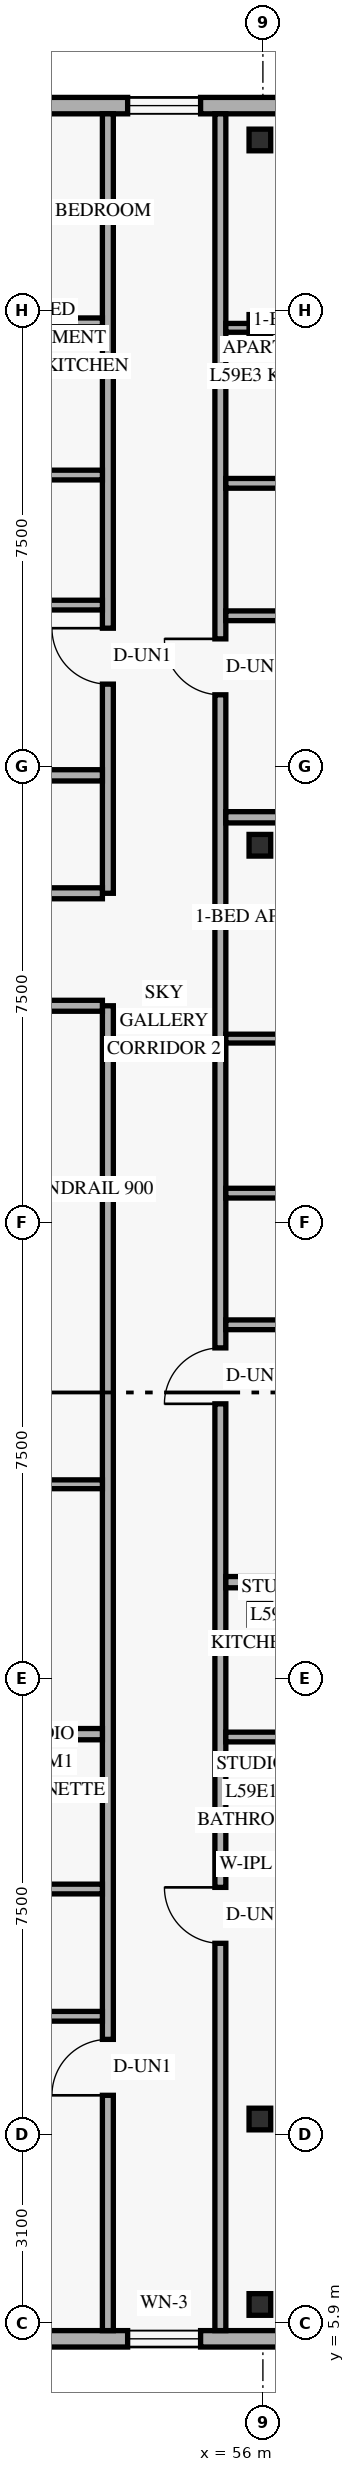
"""IFC4 building model, lengths in metres.
Left out: names, types, materials, properties, quantities, classifications, styles, units other than length and angle.
Written with IfcOpenShell. Run it as: python <this file> out.ifc"""

import sys

from ifc_helpers import new_model, si_unit, direction, frame, frame_2d, origin, origin_2d, place, context, subcontext, project, spatial, rectangle, hollow_rectangle, extrude, element, fill, save


model = new_model("IFC4")
c1 = context("Model", 3, precision=1e-05, world=origin(), true_north=direction((0.0, 1.0)))
c2 = subcontext(c1, "Body", "Model", "MODEL_VIEW")
j1 = project(units=[si_unit("LENGTHUNIT", "METRE"), si_unit("PLANEANGLEUNIT", "RADIAN")], contexts=[c1])
p1 = place(None, origin())
s1 = spatial("IfcSite", under=j1, at=p1, CompositionType="ELEMENT")
p2 = place(p1, origin())
s2 = spatial("IfcBuilding", under=s1, at=p2, CompositionType="ELEMENT")
p3 = place(p2, frame((0.0, 0.0, 227.4)))
s3 = spatial("IfcBuildingStorey", under=s2, at=p3, CompositionType="ELEMENT", Elevation=227.4)
for number, where, z_axis, x_axis in (
    (1, (55.846, 6.2, 0.0), (0.058, 0.0, 0.998), (0.0, 1.0, 0.0)),
    (2, (55.846, 9.25, 0.0), (0.058, 0.0, 0.998), (0.0, 1.0, 0.0)),
    (3, (55.846, 17.55, 0.0), (0.058, 0.0, 0.998), (0.0, 1.0, 0.0)),
    (4, (55.846, 30.2, 0.0), (0.058, 0.0, 0.998), (0.0, 1.0, 0.0)),
    (5, (55.846, 38.75, 0.0), (0.058, 0.0, 0.998), (0.0, 1.0, 0.0)),
    (6, (55.846, 41.8, 0.0), (0.058, 0.0, 0.998), (0.0, 1.0, 0.0)),
):
    element("IfcColumn", number, at=place(p3, frame(where, z_axis=z_axis, x_axis=x_axis)), inside=s3, PredefinedType="COLUMN", context=c2, shape_type="SweptSolid", body=[
        extrude(hollow_rectangle(XDim=0.356, YDim=0.356, WallThickness=0.016, at=origin_2d()), origin(), (0.0, 0.0, 1.0), 3.606),
    ])
p4 = place(p3, frame((25.82, 5.635, 0.0), z_axis=(0.0, 0.0, 1.0), x_axis=(1.0, 0.0, 0.0)))
e7 = element("IfcWall", 7, at=p4, inside=s3, PredefinedType="SOLIDWALL", context=c2, shape_type="SweptSolid", body=[
    extrude(rectangle(XDim=32.96, YDim=0.27, at=frame_2d((16.48, 0.0))), origin(), (0.0, 0.0, 1.0), 3.35),
])
p5 = place(p4, frame((3.57, 0.0, 0.85)))
e8 = element("IfcOpeningElement", 8, at=p5, cuts=e7, PredefinedType="OPENING", context=c2, shape_type="SweptSolid", body=[
    extrude(rectangle(XDim=1.8, YDim=1.6, at=frame_2d((0.9, 0.8))), frame((0.0, 0.145, 0.0), z_axis=(0.0, -1.0, 0.0), x_axis=(1.0, 0.0, 0.0)), (0.0, 0.0, 1.0), 0.29),
])
p6 = place(p4, frame((16.214, 0.0, 0.85)))
e9 = element("IfcOpeningElement", 9, at=p6, cuts=e7, PredefinedType="OPENING", context=c2, shape_type="SweptSolid", body=[
    extrude(rectangle(XDim=1.8, YDim=1.6, at=frame_2d((0.9, 0.8))), frame((0.0, 0.145, 0.0), z_axis=(0.0, -1.0, 0.0), x_axis=(1.0, 0.0, 0.0)), (0.0, 0.0, 1.0), 0.29),
])
p7 = place(p4, frame((27.955, 0.0, 0.85)))
e10 = element("IfcOpeningElement", 10, at=p7, cuts=e7, PredefinedType="OPENING", context=c2, shape_type="SweptSolid", body=[
    extrude(rectangle(XDim=1.2, YDim=1.5, at=frame_2d((0.6, 0.75))), frame((0.0, 0.145, 0.0), z_axis=(0.0, -1.0, 0.0), x_axis=(1.0, 0.0, 0.0)), (0.0, 0.0, 1.0), 0.29),
])
p8 = place(p4, frame((30.865, 0.0, 0.85)))
e11 = element("IfcOpeningElement", 11, at=p8, cuts=e7, PredefinedType="OPENING", context=c2, shape_type="SweptSolid", body=[
    extrude(rectangle(XDim=1.8, YDim=1.6, at=frame_2d((0.9, 0.8))), frame((0.0, 0.145, 0.0), z_axis=(0.0, -1.0, 0.0), x_axis=(1.0, 0.0, 0.0)), (0.0, 0.0, 1.0), 0.29),
])
p9 = place(p3, frame((58.78, 42.365, 0.0), z_axis=(0.0, 0.0, 1.0), x_axis=(-1.0, 0.0, 0.0)))
e12 = element("IfcWall", 12, at=p9, inside=s3, PredefinedType="SOLIDWALL", context=c2, shape_type="SweptSolid", body=[
    extrude(rectangle(XDim=32.96, YDim=0.27, at=frame_2d((16.48, 0.0))), origin(), (0.0, 0.0, 1.0), 3.35),
])
p10 = place(p9, frame((27.59, 0.0, 0.85)))
e13 = element("IfcOpeningElement", 13, at=p10, cuts=e12, PredefinedType="OPENING", context=c2, shape_type="SweptSolid", body=[
    extrude(rectangle(XDim=1.8, YDim=1.6, at=frame_2d((0.9, 0.8))), frame((0.0, 0.145, 0.0), z_axis=(0.0, -1.0, 0.0), x_axis=(1.0, 0.0, 0.0)), (0.0, 0.0, 1.0), 0.29),
])
p11 = place(p9, frame((14.671, 0.0, 0.85)))
e14 = element("IfcOpeningElement", 14, at=p11, cuts=e12, PredefinedType="OPENING", context=c2, shape_type="SweptSolid", body=[
    extrude(rectangle(XDim=1.8, YDim=1.6, at=frame_2d((0.9, 0.8))), frame((0.0, 0.145, 0.0), z_axis=(0.0, -1.0, 0.0), x_axis=(1.0, 0.0, 0.0)), (0.0, 0.0, 1.0), 0.29),
])
p12 = place(p9, frame((3.805, 0.0, 0.85)))
e15 = element("IfcOpeningElement", 15, at=p12, cuts=e12, PredefinedType="OPENING", context=c2, shape_type="SweptSolid", body=[
    extrude(rectangle(XDim=1.2, YDim=1.5, at=frame_2d((0.6, 0.75))), frame((0.0, 0.145, 0.0), z_axis=(0.0, -1.0, 0.0), x_axis=(1.0, 0.0, 0.0)), (0.0, 0.0, 1.0), 0.29),
])
p13 = place(p9, frame((0.295, 0.0, 0.85)))
e16 = element("IfcOpeningElement", 16, at=p13, cuts=e12, PredefinedType="OPENING", context=c2, shape_type="SweptSolid", body=[
    extrude(rectangle(XDim=1.8, YDim=1.6, at=frame_2d((0.9, 0.8))), frame((0.0, 0.145, 0.0), z_axis=(0.0, -1.0, 0.0), x_axis=(1.0, 0.0, 0.0)), (0.0, 0.0, 1.0), 0.29),
])
p14 = place(p3, frame((53.45, 5.77, 0.0), z_axis=(0.0, 0.0, 1.0), x_axis=(0.0, 1.0, 0.0)))
e17 = element("IfcWall", 17, at=p14, inside=s3, PredefinedType="STANDARD", context=c2, shape_type="SweptSolid", body=[
    extrude(rectangle(XDim=21.79, YDim=0.18, at=frame_2d((10.895, 0.0))), origin(), (0.0, 0.0, 1.0), 2.793),
])
p15 = place(p14, frame((3.87, 0.0, 0.0)))
e18 = element("IfcOpeningElement", 18, at=p15, cuts=e17, PredefinedType="OPENING", context=c2, shape_type="SweptSolid", body=[
    extrude(rectangle(XDim=0.92, YDim=2.15, at=frame_2d((0.46, 1.075))), frame((0.0, 0.1, 0.0), z_axis=(0.0, -1.0, 0.0), x_axis=(1.0, 0.0, 0.0)), (0.0, 0.0, 1.0), 0.2),
])
p16 = place(p3, frame((53.45, 29.41, 0.0), z_axis=(0.0, 0.0, 1.0), x_axis=(0.0, 1.0, 0.0)))
e19 = element("IfcWall", 19, at=p16, inside=s3, PredefinedType="STANDARD", context=c2, shape_type="SweptSolid", body=[
    extrude(rectangle(XDim=12.82, YDim=0.18, at=frame_2d((6.41, 0.0))), origin(), (0.0, 0.0, 1.0), 2.793),
])
p17 = place(p16, frame((3.44, 0.0, 0.0)))
e20 = element("IfcOpeningElement", 20, at=p17, cuts=e19, PredefinedType="OPENING", context=c2, shape_type="SweptSolid", body=[
    extrude(rectangle(XDim=0.92, YDim=2.15, at=frame_2d((0.46, 1.075))), frame((0.0, 0.1, 0.0), z_axis=(0.0, -1.0, 0.0), x_axis=(1.0, 0.0, 0.0)), (0.0, 0.0, 1.0), 0.2),
])
p18 = place(p3, frame((51.73, 27.56, 0.0), z_axis=(0.0, 0.0, 1.0), x_axis=(1.0, 0.0, 0.0)))
e21 = element("IfcWall", 21, at=p18, inside=s3, PredefinedType="STANDARD", context=c2, shape_type="SweptSolid", body=[
    extrude(rectangle(XDim=1.63, YDim=0.18, at=frame_2d((0.815, 0.0))), origin(), (0.0, 0.0, 1.0), 2.793),
])
p19 = place(p3, frame((37.64, 29.41, 0.0), z_axis=(0.0, 0.0, 1.0), x_axis=(1.0, 0.0, 0.0)))
e22 = element("IfcWall", 22, at=p19, inside=s3, PredefinedType="STANDARD", context=c2, shape_type="SweptSolid", body=[
    extrude(rectangle(XDim=15.72, YDim=0.18, at=frame_2d((7.86, 0.0))), origin(), (0.0, 0.0, 1.0), 2.793),
])
p20 = place(p3, frame((55.3, 5.77, 0.0), z_axis=(0.0, 0.0, 1.0), x_axis=(0.0, 1.0, 0.0)))
e23 = element("IfcWall", 23, at=p20, inside=s3, PredefinedType="STANDARD", context=c2, shape_type="SweptSolid", body=[
    extrude(rectangle(XDim=36.46, YDim=0.18, at=frame_2d((18.23, 0.0))), origin(), (0.0, 0.0, 1.0), 2.793),
])
p21 = place(p20, frame((6.37, 0.0, 0.0)))
e24 = element("IfcOpeningElement", 24, at=p21, cuts=e23, PredefinedType="OPENING", context=c2, shape_type="SweptSolid", body=[
    extrude(rectangle(XDim=0.92, YDim=2.15, at=frame_2d((0.46, 1.075))), frame((0.0, 0.1, 0.0), z_axis=(0.0, -1.0, 0.0), x_axis=(1.0, 0.0, 0.0)), (0.0, 0.0, 1.0), 0.2),
])
p22 = place(p20, frame((15.243, 0.0, 0.0)))
e25 = element("IfcOpeningElement", 25, at=p22, cuts=e23, PredefinedType="OPENING", context=c2, shape_type="SweptSolid", body=[
    extrude(rectangle(XDim=0.92, YDim=2.15, at=frame_2d((0.46, 1.075))), frame((0.0, 0.1, 0.0), z_axis=(0.0, -1.0, 0.0), x_axis=(1.0, 0.0, 0.0)), (0.0, 0.0, 1.0), 0.2),
])
p23 = place(p20, frame((26.905, 0.0, 0.0)))
e26 = element("IfcOpeningElement", 26, at=p23, cuts=e23, PredefinedType="OPENING", context=c2, shape_type="SweptSolid", body=[
    extrude(rectangle(XDim=0.92, YDim=2.15, at=frame_2d((0.46, 1.075))), frame((0.0, 0.1, 0.0), z_axis=(0.0, -1.0, 0.0), x_axis=(1.0, 0.0, 0.0)), (0.0, 0.0, 1.0), 0.2),
])
p24 = place(p3, frame((55.39, 13.44, 0.0), z_axis=(0.0, 0.0, 1.0), x_axis=(1.0, 0.0, 0.0)))
e27 = element("IfcWall", 27, at=p24, inside=s3, PredefinedType="PLUMBINGWALL", context=c2, shape_type="SweptSolid", body=[
    extrude(rectangle(XDim=2.606, YDim=0.16, at=frame_2d((1.303, 0.0))), origin(), (0.0, 0.0, 1.0), 2.793),
])
p25 = place(p3, frame((55.39, 15.533, 0.0), z_axis=(0.0, 0.0, 1.0), x_axis=(1.0, 0.0, 0.0)))
e28 = element("IfcWall", 28, at=p25, inside=s3, PredefinedType="PLUMBINGWALL", context=c2, shape_type="SweptSolid", body=[
    extrude(rectangle(XDim=2.446, YDim=0.16, at=frame_2d((1.223, 0.0))), origin(), (0.0, 0.0, 1.0), 2.793),
])
p26 = place(p3, frame((55.39, 18.08, 0.0), z_axis=(0.0, 0.0, 1.0), x_axis=(1.0, 0.0, 0.0)))
e29 = element("IfcWall", 29, at=p26, inside=s3, PredefinedType="PARTITIONING", context=c2, shape_type="SweptSolid", body=[
    extrude(rectangle(XDim=6.74, YDim=0.185, at=frame_2d((3.37, 0.0))), origin(), (0.0, 0.0, 1.0), 2.793),
])
p27 = place(p3, frame((55.39, 27.02, 0.0), z_axis=(0.0, 0.0, 1.0), x_axis=(1.0, 0.0, 0.0)))
e30 = element("IfcWall", 30, at=p27, inside=s3, PredefinedType="PARTITIONING", context=c2, shape_type="SweptSolid", body=[
    extrude(rectangle(XDim=6.74, YDim=0.145, at=frame_2d((3.37, 0.0))), origin(), (0.0, 0.0, 1.0), 2.793),
])
p28 = place(p27, frame((4.386, 0.0, 0.0)))
e31 = element("IfcOpeningElement", 31, at=p28, cuts=e30, PredefinedType="OPENING", context=c2, shape_type="SweptSolid", body=[
    extrude(rectangle(XDim=0.9, YDim=2.14, at=frame_2d((0.45, 1.07))), frame((0.0, 0.083, 0.0), z_axis=(0.0, -1.0, 0.0), x_axis=(1.0, 0.0, 0.0)), (0.0, 0.0, 1.0), 0.165),
])
p29 = place(p3, frame((55.39, 22.313, 0.0), z_axis=(0.0, 0.0, 1.0), x_axis=(1.0, 0.0, 0.0)))
e32 = element("IfcWall", 32, at=p29, inside=s3, PredefinedType="PLUMBINGWALL", context=c2, shape_type="SweptSolid", body=[
    extrude(rectangle(XDim=2.712, YDim=0.16, at=frame_2d((1.356, 0.0))), origin(), (0.0, 0.0, 1.0), 2.793),
])
p30 = place(p3, frame((55.39, 24.478, 0.0), z_axis=(0.0, 0.0, 1.0), x_axis=(1.0, 0.0, 0.0)))
e33 = element("IfcWall", 33, at=p30, inside=s3, PredefinedType="PLUMBINGWALL", context=c2, shape_type="SweptSolid", body=[
    extrude(rectangle(XDim=2.552, YDim=0.16, at=frame_2d((1.276, 0.0))), origin(), (0.0, 0.0, 1.0), 2.793),
])
p31 = place(p3, frame((55.39, 30.66, 0.0), z_axis=(0.0, 0.0, 1.0), x_axis=(1.0, 0.0, 0.0)))
e34 = element("IfcWall", 34, at=p31, inside=s3, PredefinedType="PARTITIONING", context=c2, shape_type="SweptSolid", body=[
    extrude(rectangle(XDim=6.74, YDim=0.185, at=frame_2d((3.37, 0.0))), origin(), (0.0, 0.0, 1.0), 2.793),
])
p32 = place(p3, frame((55.39, 38.71, 0.0), z_axis=(0.0, 0.0, 1.0), x_axis=(1.0, 0.0, 0.0)))
e35 = element("IfcWall", 35, at=p32, inside=s3, PredefinedType="PARTITIONING", context=c2, shape_type="SweptSolid", body=[
    extrude(rectangle(XDim=6.74, YDim=0.145, at=frame_2d((3.37, 0.0))), origin(), (0.0, 0.0, 1.0), 2.793),
])
p33 = place(p32, frame((4.424, 0.0, 0.0)))
e36 = element("IfcOpeningElement", 36, at=p33, cuts=e35, PredefinedType="OPENING", context=c2, shape_type="SweptSolid", body=[
    extrude(rectangle(XDim=0.9, YDim=2.14, at=frame_2d((0.45, 1.07))), frame((0.0, 0.083, 0.0), z_axis=(0.0, -1.0, 0.0), x_axis=(1.0, 0.0, 0.0)), (0.0, 0.0, 1.0), 0.165),
])
p34 = place(p3, frame((55.39, 33.975, 0.0), z_axis=(0.0, 0.0, 1.0), x_axis=(1.0, 0.0, 0.0)))
e37 = element("IfcWall", 37, at=p34, inside=s3, PredefinedType="PLUMBINGWALL", context=c2, shape_type="SweptSolid", body=[
    extrude(rectangle(XDim=2.788, YDim=0.16, at=frame_2d((1.394, 0.0))), origin(), (0.0, 0.0, 1.0), 2.793),
])
p35 = place(p3, frame((55.39, 36.153, 0.0), z_axis=(0.0, 0.0, 1.0), x_axis=(1.0, 0.0, 0.0)))
e38 = element("IfcWall", 38, at=p35, inside=s3, PredefinedType="PLUMBINGWALL", context=c2, shape_type="SweptSolid", body=[
    extrude(rectangle(XDim=2.628, YDim=0.16, at=frame_2d((1.314, 0.0))), origin(), (0.0, 0.0, 1.0), 2.793),
])
p36 = place(p3, frame((38.423, 15.58, 0.0), z_axis=(0.0, 0.0, 1.0), x_axis=(1.0, 0.0, 0.0)))
e39 = element("IfcWall", 39, at=p36, inside=s3, PredefinedType="PARTITIONING", context=c2, shape_type="SweptSolid", body=[
    extrude(rectangle(XDim=14.938, YDim=0.185, at=frame_2d((7.469, 0.0))), origin(), (0.0, 0.0, 1.0), 2.793),
])
p37 = place(p3, frame((50.526, 10.94, 0.0), z_axis=(0.0, 0.0, 1.0), x_axis=(1.0, 0.0, 0.0)))
e40 = element("IfcWall", 40, at=p37, inside=s3, PredefinedType="PLUMBINGWALL", context=c2, shape_type="SweptSolid", body=[
    extrude(rectangle(XDim=2.834, YDim=0.16, at=frame_2d((1.417, 0.0))), origin(), (0.0, 0.0, 1.0), 3.35),
])
p38 = place(p3, frame((50.686, 13.033, 0.0), z_axis=(0.0, 0.0, 1.0), x_axis=(1.0, 0.0, 0.0)))
e41 = element("IfcWall", 41, at=p38, inside=s3, PredefinedType="PLUMBINGWALL", context=c2, shape_type="SweptSolid", body=[
    extrude(rectangle(XDim=2.674, YDim=0.16, at=frame_2d((1.337, 0.0))), origin(), (0.0, 0.0, 1.0), 3.35),
])
p39 = place(p3, frame((51.73, 19.69, 0.0), z_axis=(0.0, 0.0, 1.0), x_axis=(1.0, 0.0, 0.0)))
e42 = element("IfcWall", 42, at=p39, inside=s3, PredefinedType="PARTITIONING", context=c2, shape_type="SweptSolid", body=[
    extrude(rectangle(XDim=1.63, YDim=0.145, at=frame_2d((0.815, 0.0))), origin(), (0.0, 0.0, 1.0), 2.793),
])
p40 = place(p3, frame((38.972, 31.35, 0.0), z_axis=(0.0, 0.0, 1.0), x_axis=(1.0, 0.0, 0.0)))
e43 = element("IfcWall", 43, at=p40, inside=s3, PredefinedType="PARTITIONING", context=c2, shape_type="SweptSolid", body=[
    extrude(rectangle(XDim=14.388, YDim=0.185, at=frame_2d((7.194, 0.0))), origin(), (0.0, 0.0, 1.0), 2.793),
])
p41 = place(p3, frame((38.51, 38.8, 0.0), z_axis=(0.0, 0.0, 1.0), x_axis=(1.0, 0.0, 0.0)))
e44 = element("IfcWall", 44, at=p41, inside=s3, PredefinedType="PARTITIONING", context=c2, shape_type="SweptSolid", body=[
    extrude(rectangle(XDim=14.85, YDim=0.145, at=frame_2d((7.425, 0.0))), origin(), (0.0, 0.0, 1.0), 2.793),
])
p42 = place(p41, frame((7.69, 0.0, 0.0)))
e45 = element("IfcOpeningElement", 45, at=p42, cuts=e44, PredefinedType="OPENING", context=c2, shape_type="SweptSolid", body=[
    extrude(rectangle(XDim=0.9, YDim=2.14, at=frame_2d((0.45, 1.07))), frame((0.0, 0.083, 0.0), z_axis=(0.0, -1.0, 0.0), x_axis=(1.0, 0.0, 0.0)), (0.0, 0.0, 1.0), 0.165),
])
p43 = place(p3, frame((50.8, 34.15, 0.0), z_axis=(0.0, 0.0, 1.0), x_axis=(1.0, 0.0, 0.0)))
e46 = element("IfcWall", 46, at=p43, inside=s3, PredefinedType="PLUMBINGWALL", context=c2, shape_type="SweptSolid", body=[
    extrude(rectangle(XDim=2.56, YDim=0.16, at=frame_2d((1.28, 0.0))), origin(), (0.0, 0.0, 1.0), 3.35),
])
p44 = place(p3, frame((50.96, 36.289, 0.0), z_axis=(0.0, 0.0, 1.0), x_axis=(1.0, 0.0, 0.0)))
e47 = element("IfcWall", 47, at=p44, inside=s3, PredefinedType="PLUMBINGWALL", context=c2, shape_type="SweptSolid", body=[
    extrude(rectangle(XDim=2.4, YDim=0.16, at=frame_2d((1.2, 0.0))), origin(), (0.0, 0.0, 1.0), 3.35),
])
p45 = place(p7, origin())
e48 = element("IfcWindow", 48, at=p45, inside=s3, PartitioningType="SINGLE_PANEL", PredefinedType="WINDOW", context=c2, shape_type="SweptSolid", body=[
    extrude(rectangle(XDim=1.2, YDim=1.5, at=frame_2d((0.6, 0.75))), frame((0.0, 0.03, 0.0), z_axis=(0.0, -1.0, 0.0), x_axis=(1.0, 0.0, 0.0)), (0.0, 0.0, 1.0), 0.06),
])
fill(e10, e48)
p46 = place(p12, origin())
e49 = element("IfcWindow", 49, at=p46, inside=s3, PartitioningType="SINGLE_PANEL", PredefinedType="WINDOW", context=c2, shape_type="SweptSolid", body=[
    extrude(rectangle(XDim=1.2, YDim=1.5, at=frame_2d((0.6, 0.75))), frame((0.0, 0.03, 0.0), z_axis=(0.0, -1.0, 0.0), x_axis=(1.0, 0.0, 0.0)), (0.0, 0.0, 1.0), 0.06),
])
fill(e15, e49)
p47 = place(p21, origin())
e50 = element("IfcDoor", 50, at=p47, inside=s3, OperationType="SINGLE_SWING_RIGHT", PredefinedType="DOOR", context=c2, shape_type="SweptSolid", body=[
    extrude(rectangle(XDim=0.92, YDim=2.15, at=frame_2d((0.46, 1.075))), frame((0.0, 0.025, 0.0), z_axis=(0.0, -1.0, 0.0), x_axis=(1.0, 0.0, 0.0)), (0.0, 0.0, 1.0), 0.05),
])
fill(e24, e50)
p48 = place(p22, origin())
e51 = element("IfcDoor", 51, at=p48, inside=s3, OperationType="SINGLE_SWING_LEFT", PredefinedType="DOOR", context=c2, shape_type="SweptSolid", body=[
    extrude(rectangle(XDim=0.92, YDim=2.15, at=frame_2d((0.46, 1.075))), frame((0.0, 0.025, 0.0), z_axis=(0.0, -1.0, 0.0), x_axis=(1.0, 0.0, 0.0)), (0.0, 0.0, 1.0), 0.05),
])
fill(e25, e51)
p49 = place(p23, origin())
e52 = element("IfcDoor", 52, at=p49, inside=s3, OperationType="SINGLE_SWING_RIGHT", PredefinedType="DOOR", context=c2, shape_type="SweptSolid", body=[
    extrude(rectangle(XDim=0.92, YDim=2.15, at=frame_2d((0.46, 1.075))), frame((0.0, 0.025, 0.0), z_axis=(0.0, -1.0, 0.0), x_axis=(1.0, 0.0, 0.0)), (0.0, 0.0, 1.0), 0.05),
])
fill(e26, e52)
p50 = place(p15, origin())
e53 = element("IfcDoor", 53, at=p50, inside=s3, OperationType="SINGLE_SWING_LEFT", PredefinedType="DOOR", context=c2, shape_type="SweptSolid", body=[
    extrude(rectangle(XDim=0.92, YDim=2.15, at=frame_2d((0.46, 1.075))), frame((0.0, 0.025, 0.0), z_axis=(0.0, -1.0, 0.0), x_axis=(1.0, 0.0, 0.0)), (0.0, 0.0, 1.0), 0.05),
])
fill(e18, e53)
p51 = place(p17, origin())
e54 = element("IfcDoor", 54, at=p51, inside=s3, OperationType="SINGLE_SWING_RIGHT", PredefinedType="DOOR", context=c2, shape_type="SweptSolid", body=[
    extrude(rectangle(XDim=0.92, YDim=2.15, at=frame_2d((0.46, 1.075))), frame((0.0, 0.025, 0.0), z_axis=(0.0, -1.0, 0.0), x_axis=(1.0, 0.0, 0.0)), (0.0, 0.0, 1.0), 0.05),
])
fill(e20, e54)
save(model, sys.argv[1])
